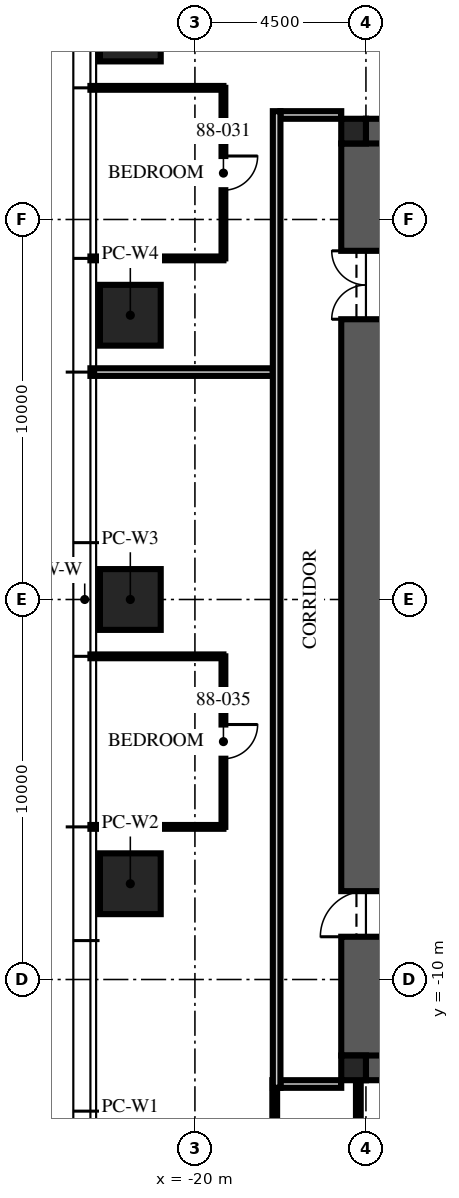
"""IFC4 building model, lengths in metres.
Left out: names, types, materials, properties, quantities, classifications, styles, units other than length and angle.
Written with IfcOpenShell. Run it as: python <this file> out.ifc"""

import sys

from ifc_helpers import new_model, si_unit, direction, frame, frame_2d, origin, origin_2d, place, context, subcontext, project, spatial, rectangle, extrude, element, fill, save


model = new_model("IFC4")
c1 = context("Model", 3, precision=1e-05, world=origin(), true_north=direction((0.0, 1.0)))
c2 = subcontext(c1, "Body", "Model", "MODEL_VIEW")
j1 = project(units=[si_unit("LENGTHUNIT", "METRE"), si_unit("PLANEANGLEUNIT", "RADIAN")], contexts=[c1])
p1 = place(None, origin())
s1 = spatial("IfcSite", under=j1, at=p1, CompositionType="ELEMENT")
p2 = place(p1, origin())
s2 = spatial("IfcBuilding", under=s1, at=p2, CompositionType="ELEMENT")
p3 = place(p2, frame((0.0, 0.0, 349.5)))
s3 = spatial("IfcBuildingStorey", under=s2, at=p3, CompositionType="ELEMENT", Elevation=349.5)
for number, where, z_axis, x_axis in (
    (1, (-15.5, 12.0, -0.25), (0.0, 0.0, 1.0), (1.0, 0.0, 0.0)),
    (2, (-15.5, -12.0, -0.25), (0.0, 0.0, 1.0), (1.0, 0.0, 0.0)),
):
    element("IfcWall", number, at=place(p3, frame(where, z_axis=z_axis, x_axis=x_axis)), inside=s3, PredefinedType="SHEAR", context=c2, shape_type="SweptSolid", body=[
        extrude(rectangle(XDim=31.0, YDim=1.3, at=frame_2d((15.5, 0.0))), origin(), (0.0, 0.0, 1.0), 3.7),
    ])
p4 = place(p3, frame((-15.5, -12.0, -0.25), z_axis=(0.0, 0.0, 1.0), x_axis=(0.0, 1.0, 0.0)))
e3 = element("IfcWall", 3, at=p4, inside=s3, PredefinedType="SHEAR", context=c2, shape_type="SweptSolid", body=[
    extrude(rectangle(XDim=24.0, YDim=1.3, at=frame_2d((12.0, 0.0))), origin(), (0.0, 0.0, 1.0), 3.7),
])
p5 = place(p4, frame((3.125, 0.0, 0.25)))
e4 = element("IfcOpeningElement", 4, at=p5, cuts=e3, PredefinedType="OPENING", context=c2, shape_type="SweptSolid", body=[
    extrude(rectangle(XDim=1.2, YDim=2.1, at=frame_2d((0.6, 1.05))), frame((0.0, 0.66, 0.0), z_axis=(0.0, -1.0, 0.0), x_axis=(1.0, 0.0, 0.0)), (0.0, 0.0, 1.0), 1.32),
])
p6 = place(p4, frame((19.375, 0.0, 0.25)))
e5 = element("IfcOpeningElement", 5, at=p6, cuts=e3, PredefinedType="OPENING", context=c2, shape_type="SweptSolid", body=[
    extrude(rectangle(XDim=1.8, YDim=2.1, at=frame_2d((0.9, 1.05))), frame((0.0, 0.66, 0.0), z_axis=(0.0, -1.0, 0.0), x_axis=(1.0, 0.0, 0.0)), (0.0, 0.0, 1.0), 1.32),
])
for number, where, z_axis, x_axis in (
    (6, (-15.825, 12.325, -0.25), (0.0, 0.0, 1.0), (1.0, 0.0, 0.0)),
    (7, (-15.825, -12.325, -0.25), (0.0, 0.0, 1.0), (1.0, 0.0, 0.0)),
):
    element("IfcColumn", number, at=place(p3, frame(where, z_axis=z_axis, x_axis=x_axis)), inside=s3, PredefinedType="COLUMN", context=c2, shape_type="SweptSolid", body=[
        extrude(rectangle(XDim=0.65, YDim=0.65, at=origin_2d()), origin(), (0.0, 0.0, 1.0), 3.7),
    ])
for number, where, z_axis, x_axis in (
    (8, (-21.7, -7.48, 0.0), (0.0, 0.0, 1.0), (0.0, 1.0, 0.0)),
    (9, (-21.7, 0.0, 0.0), (0.0, 0.0, 1.0), (0.0, 1.0, 0.0)),
    (10, (-21.7, 7.48, 0.0), (0.0, 0.0, 1.0), (0.0, 1.0, 0.0)),
    (11, (-21.7, 14.96, 0.0), (0.0, 0.0, 1.0), (0.0, 1.0, 0.0)),
):
    element("IfcColumn", number, at=place(p3, frame(where, z_axis=z_axis, x_axis=x_axis)), inside=s3, PredefinedType="COLUMN", context=c2, shape_type="SweptSolid", body=[
        extrude(rectangle(XDim=1.6, YDim=1.6, at=origin_2d()), origin(), (0.0, 0.0, 1.0), 3.75),
    ])
for number, where, z_axis, x_axis in (
    (12, (-16.15, 12.75, 0.0), (0.0, 0.0, 1.0), (-1.0, 0.0, 0.0)),
    (13, (-16.15, -12.75, 0.0), (0.0, 0.0, 1.0), (-1.0, 0.0, 0.0)),
):
    element("IfcWall", number, at=place(p3, frame(where, z_axis=z_axis, x_axis=x_axis)), inside=s3, PredefinedType="PARTITIONING", context=c2, shape_type="SweptSolid", body=[
        extrude(rectangle(XDim=1.6, YDim=0.2, at=frame_2d((0.8, 0.0))), origin(), (0.0, 0.0, 1.0), 2.45),
    ])
for number, where, z_axis, x_axis in (
    (14, (-19.25, 13.464, 0.0), (0.0, 0.0, 1.0), (-1.0, 0.0, 0.0)),
    (15, (-19.25, 8.976, 0.0), (0.0, 0.0, 1.0), (-1.0, 0.0, 0.0)),
):
    element("IfcWall", number, at=place(p3, frame(where, z_axis=z_axis, x_axis=x_axis)), inside=s3, PredefinedType="PARTITIONING", context=c2, shape_type="SweptSolid", body=[
        extrude(rectangle(XDim=3.5, YDim=0.1, at=frame_2d((1.75, 0.0))), origin(), (0.0, 0.0, 1.0), 2.85),
    ])
p7 = place(p3, frame((-17.95, 5.984, 0.0), z_axis=(0.0, 0.0, 1.0), x_axis=(-1.0, 0.0, 0.0)))
e16 = element("IfcWall", 16, at=p7, inside=s3, PredefinedType="PARTITIONING", context=c2, shape_type="SweptSolid", body=[
    extrude(rectangle(XDim=4.8, YDim=0.2, at=frame_2d((2.4, 0.0))), origin(), (0.0, 0.0, 1.0), 2.85),
])
for number, where, z_axis, x_axis in (
    (17, (-19.25, -1.496, 0.0), (0.0, 0.0, 1.0), (-1.0, 0.0, 0.0)),
    (18, (-19.25, -5.984, 0.0), (0.0, 0.0, 1.0), (-1.0, 0.0, 0.0)),
):
    element("IfcWall", number, at=place(p3, frame(where, z_axis=z_axis, x_axis=x_axis)), inside=s3, PredefinedType="PARTITIONING", context=c2, shape_type="SweptSolid", body=[
        extrude(rectangle(XDim=3.5, YDim=0.1, at=frame_2d((1.75, 0.0))), origin(), (0.0, 0.0, 1.0), 2.85),
    ])
p8 = place(p3, frame((-19.25, 13.464, 0.0), z_axis=(0.0, 0.0, 1.0), x_axis=(0.0, -1.0, 0.0)))
e19 = element("IfcWall", 19, at=p8, inside=s3, PredefinedType="PARTITIONING", context=c2, shape_type="SweptSolid", body=[
    extrude(rectangle(XDim=4.488, YDim=0.1, at=frame_2d((2.244, 0.0))), origin(), (0.0, 0.0, 1.0), 2.56),
])
p9 = place(p8, frame((1.794, 0.0, 0.0)))
e20 = element("IfcOpeningElement", 20, at=p9, cuts=e19, PredefinedType="OPENING", context=c2, shape_type="SweptSolid", body=[
    extrude(rectangle(XDim=0.9, YDim=2.1, at=frame_2d((0.45, 1.05))), frame((0.0, 0.06, 0.0), z_axis=(0.0, -1.0, 0.0), x_axis=(1.0, 0.0, 0.0)), (0.0, 0.0, 1.0), 0.12),
])
p10 = place(p3, frame((-19.25, -1.496, 0.0), z_axis=(0.0, 0.0, 1.0), x_axis=(0.0, -1.0, 0.0)))
e21 = element("IfcWall", 21, at=p10, inside=s3, PredefinedType="PARTITIONING", context=c2, shape_type="SweptSolid", body=[
    extrude(rectangle(XDim=4.488, YDim=0.1, at=frame_2d((2.244, 0.0))), origin(), (0.0, 0.0, 1.0), 2.56),
])
p11 = place(p10, frame((1.794, 0.0, 0.0)))
e22 = element("IfcOpeningElement", 22, at=p11, cuts=e21, PredefinedType="OPENING", context=c2, shape_type="SweptSolid", body=[
    extrude(rectangle(XDim=0.9, YDim=2.1, at=frame_2d((0.45, 1.05))), frame((0.0, 0.06, 0.0), z_axis=(0.0, -1.0, 0.0), x_axis=(1.0, 0.0, 0.0)), (0.0, 0.0, 1.0), 0.12),
])
for number, where, z_axis, x_axis in (
    (23, (-17.9, -12.65, 0.0), (0.0, 0.0, 1.0), (0.0, -1.0, 0.0)),
    (24, (-15.7, -12.65, 0.0), (0.0, 0.0, 1.0), (0.0, -1.0, 0.0)),
):
    element("IfcWall", number, at=place(p3, frame(where, z_axis=z_axis, x_axis=x_axis)), inside=s3, PredefinedType="PARTITIONING", context=c2, shape_type="SweptSolid", body=[
        extrude(rectangle(XDim=3.346, YDim=0.125, at=frame_2d((1.673, 0.0))), origin(), (0.0, 0.0, 1.0), 2.45),
    ])
p12 = place(p3, frame((-17.85, 12.85, 0.0), z_axis=(0.0, 0.0, 1.0), x_axis=(0.0, -1.0, 0.0)))
e25 = element("IfcWall", 25, at=p12, inside=s3, PredefinedType="PARTITIONING", context=c2, shape_type="SweptSolid", body=[
    extrude(rectangle(XDim=25.7, YDim=0.2, at=frame_2d((12.85, 0.0))), origin(), (0.0, 0.0, 1.0), 2.45),
])
p13 = place(p5, origin())
e26 = element("IfcDoor", 26, at=p13, inside=s3, OperationType="SINGLE_SWING_LEFT", PredefinedType="DOOR", context=c2, shape_type="SweptSolid", body=[
    extrude(rectangle(XDim=1.2, YDim=2.1, at=frame_2d((0.6, 1.05))), frame((0.0, 0.025, 0.0), z_axis=(0.0, -1.0, 0.0), x_axis=(1.0, 0.0, 0.0)), (0.0, 0.0, 1.0), 0.05),
])
fill(e4, e26)
p14 = place(p6, origin())
e27 = element("IfcDoor", 27, at=p14, inside=s3, OperationType="DOUBLE_DOOR_SINGLE_SWING", PredefinedType="DOOR", context=c2, shape_type="SweptSolid", body=[
    extrude(rectangle(XDim=1.8, YDim=2.1, at=frame_2d((0.9, 1.05))), frame((0.0, 0.025, 0.0), z_axis=(0.0, -1.0, 0.0), x_axis=(1.0, 0.0, 0.0)), (0.0, 0.0, 1.0), 0.05),
])
fill(e5, e27)
p15 = place(p9, origin())
e28 = element("IfcDoor", 28, at=p15, inside=s3, OperationType="SINGLE_SWING_LEFT", PredefinedType="DOOR", context=c2, shape_type="SweptSolid", body=[
    extrude(rectangle(XDim=0.9, YDim=2.1, at=frame_2d((0.45, 1.05))), frame((0.0, 0.025, 0.0), z_axis=(0.0, -1.0, 0.0), x_axis=(1.0, 0.0, 0.0)), (0.0, 0.0, 1.0), 0.05),
])
fill(e20, e28)
p16 = place(p11, origin())
e29 = element("IfcDoor", 29, at=p16, inside=s3, OperationType="SINGLE_SWING_LEFT", PredefinedType="DOOR", context=c2, shape_type="SweptSolid", body=[
    extrude(rectangle(XDim=0.9, YDim=2.1, at=frame_2d((0.45, 1.05))), frame((0.0, 0.025, 0.0), z_axis=(0.0, -1.0, 0.0), x_axis=(1.0, 0.0, 0.0)), (0.0, 0.0, 1.0), 0.05),
])
fill(e22, e29)
save(model, sys.argv[1])
